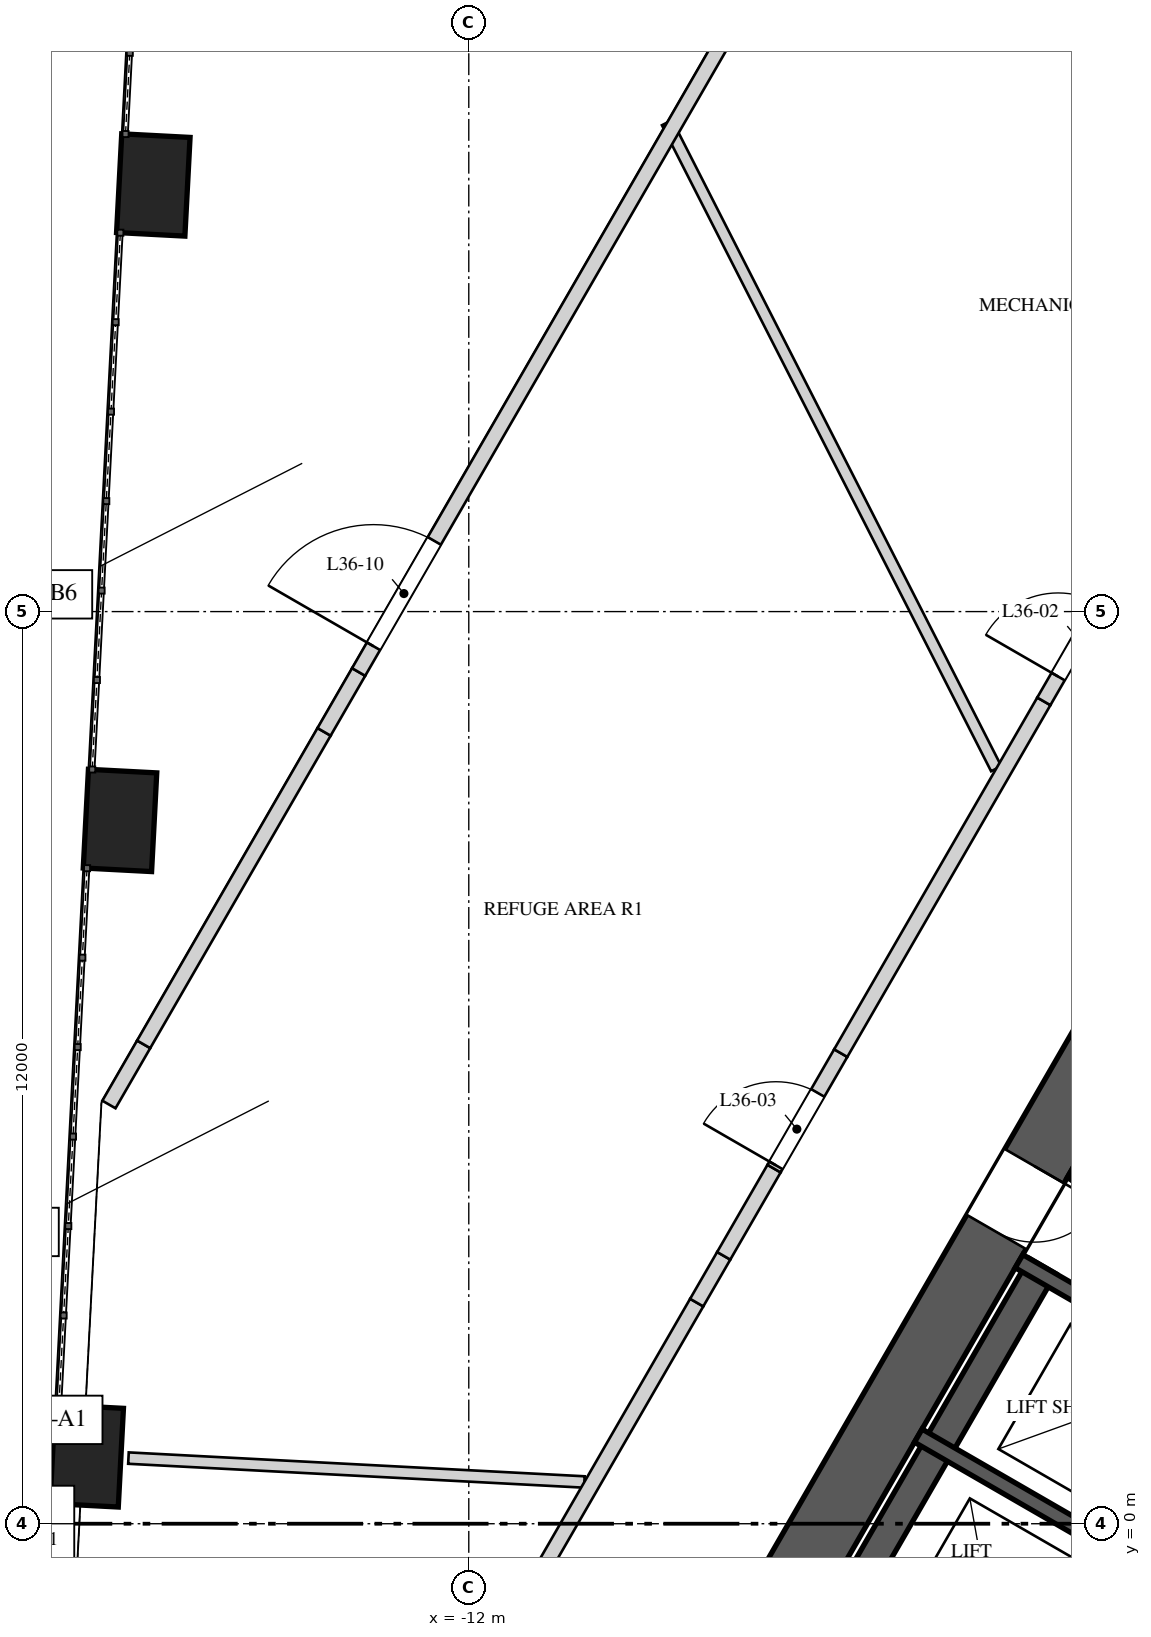
"""IFC4 building model, lengths in metres.
Left out: names, types, materials, properties, quantities, classifications, styles, units other than length and angle.
Written with IfcOpenShell. Run it as: python <this file> out.ifc"""

import sys

from ifc_helpers import new_model, si_unit, direction, frame, frame_2d, origin, origin_2d, place, context, subcontext, project, spatial, polyline, rectangle, outline, extrude, element, fill, save


model = new_model("IFC4")
c1 = context("Model", 3, precision=1e-05, world=origin(), true_north=direction((0.0, 1.0)))
c2 = subcontext(c1, "Body", "Model", "MODEL_VIEW")
j1 = project(units=[si_unit("LENGTHUNIT", "METRE"), si_unit("PLANEANGLEUNIT", "RADIAN")], contexts=[c1])
p1 = place(None, origin())
s1 = spatial("IfcSite", under=j1, at=p1, CompositionType="ELEMENT")
p2 = place(p1, origin())
s2 = spatial("IfcBuilding", under=s1, at=p2, CompositionType="ELEMENT")
p3 = place(p2, frame((0.0, 0.0, 157.6)))
s3 = spatial("IfcBuildingStorey", under=s2, at=p3, CompositionType="ELEMENT", Elevation=157.6)
p4 = place(p3, frame((-1.184, 10.55, 0.0), z_axis=(0.0, 0.0, 1.0), x_axis=(-0.500004814304, -0.866022624227, 0.0)))
e1 = element("IfcWall", 1, at=p4, inside=s3, PredefinedType="SHEAR", context=c2, shape_type="SweptSolid", body=[
    extrude(rectangle(XDim=17.09, YDim=0.9, at=frame_2d((8.545, 0.0))), origin(), (0.0, 0.0, 1.0), 5.2),
])
p5 = place(p4, frame((6.75, 0.0, 0.0)))
e2 = element("IfcOpeningElement", 2, at=p5, cuts=e1, PredefinedType="OPENING", context=c2, shape_type="SweptSolid", body=[
    extrude(rectangle(XDim=1.0, YDim=2.4, at=frame_2d((0.5, 1.2))), frame((0.0, 0.46, 0.0), z_axis=(0.0, -1.0, 0.0), x_axis=(1.0, 0.0, 0.0)), (0.0, 0.0, 1.0), 0.92),
])
for number, where, z_axis, x_axis in (
    (3, (-16.15, 17.613, 0.0), (0.0, 0.0, 1.0), (-0.052, -0.999, 0.0)),
    (4, (-16.588, 9.252, 0.0), (0.0, 0.0, 1.0), (-0.052, -0.999, 0.0)),
    (5, (-17.027, 0.892, 0.0), (0.0, 0.0, 1.0), (-0.052, -0.999, 0.0)),
):
    element("IfcColumn", number, at=place(p3, frame(where, z_axis=z_axis, x_axis=x_axis)), inside=s3, PredefinedType="COLUMN", context=c2, shape_type="SweptSolid", body=[
        extrude(rectangle(XDim=1.3, YDim=0.9, at=origin_2d()), origin(), (0.0, 0.0, 1.0), 2.835),
    ])
p6 = place(p3, frame((-1.521, 3.165, 0.0), z_axis=(0.0, 0.0, 1.0), x_axis=(-0.866039495442, 0.49997559174, 0.0)))
e6 = element("IfcWall", 6, at=p6, inside=s3, PredefinedType="SOLIDWALL", context=c2, shape_type="SweptSolid", body=[
    extrude(rectangle(XDim=2.95, YDim=0.2, at=frame_2d((1.475, 0.0))), origin(), (0.0, 0.0, 1.0), 4.85),
])
p7 = place(p6, frame((0.725, 0.0, 0.0)))
e7 = element("IfcOpeningElement", 7, at=p7, cuts=e6, PredefinedType="OPENING", context=c2, shape_type="SweptSolid", body=[
    extrude(rectangle(XDim=1.1, YDim=2.4, at=frame_2d((0.55, 1.2))), frame((0.0, 0.11, 0.0), z_axis=(0.0, -1.0, 0.0), x_axis=(1.0, 0.0, 0.0)), (0.0, 0.0, 1.0), 0.22),
])
p8 = place(p3, frame((-2.243, 2.115, 0.0), z_axis=(0.0, 0.0, 1.0), x_axis=(-0.499996545922, -0.866027397988, 0.0)))
e8 = element("IfcWall", 8, at=p8, inside=s3, PredefinedType="SOLIDWALL", context=c2, shape_type="SweptSolid", body=[
    extrude(rectangle(XDim=5.5, YDim=0.2, at=frame_2d((2.75, 0.0))), origin(), (0.0, 0.0, 1.0), 4.85),
])
p9 = place(p8, frame((1.22, 0.0, 0.0)))
e9 = element("IfcOpeningElement", 9, at=p9, cuts=e8, PredefinedType="OPENING", context=c2, shape_type="SweptSolid", body=[
    extrude(rectangle(XDim=1.1, YDim=2.1, at=frame_2d((0.55, 1.05))), frame((0.0, 0.11, 0.0), z_axis=(0.0, -1.0, 0.0), x_axis=(1.0, 0.0, 0.0)), (0.0, 0.0, 1.0), 0.22),
])
p10 = place(p8, frame((3.525, 0.0, 0.0)))
e10 = element("IfcOpeningElement", 10, at=p10, cuts=e8, PredefinedType="OPENING", context=c2, shape_type="SweptSolid", body=[
    extrude(rectangle(XDim=1.1, YDim=2.1, at=frame_2d((0.55, 1.05))), frame((0.0, 0.11, 0.0), z_axis=(0.0, -1.0, 0.0), x_axis=(1.0, 0.0, 0.0)), (0.0, 0.0, 1.0), 0.22),
])
p11 = place(p3, frame((-4.451, 3.39, 0.0), z_axis=(0.0, 0.0, 1.0), x_axis=(-0.499996545922, -0.866027397988, 0.0)))
e11 = element("IfcWall", 11, at=p11, inside=s3, PredefinedType="SOLIDWALL", context=c2, shape_type="SweptSolid", body=[
    extrude(rectangle(XDim=5.5, YDim=0.4, at=frame_2d((2.75, 0.0))), origin(), (0.0, 0.0, 1.0), 4.85),
])
for number, where, z_axis, x_axis in (
    (12, (-2.38, 2.078, 0.0), (0.0, 0.0, 1.0), (-0.866, 0.5, 0.0)),
    (13, (-3.705, -0.217, 0.0), (0.0, 0.0, 1.0), (-0.866, 0.5, 0.0)),
):
    element("IfcWall", number, at=place(p3, frame(where, z_axis=z_axis, x_axis=x_axis)), inside=s3, PredefinedType="SOLIDWALL", context=c2, shape_type="SweptSolid", body=[
        extrude(rectangle(XDim=2.75, YDim=0.2, at=frame_2d((1.375, 0.0))), origin(), (0.0, 0.0, 1.0), 4.85),
    ])
p12 = place(p3, frame((-10.479, 0.549, 0.0), z_axis=(0.0, 0.0, 1.0), x_axis=(-0.998630600864, 0.052315609692, 0.0)))
e14 = element("IfcWall", 14, at=p12, inside=s3, PredefinedType="PARTITIONING", context=c2, shape_type="SweptSolid", body=[
    extrude(rectangle(XDim=6.006, YDim=0.15, at=frame_2d((3.003, 0.0))), origin(), (0.0, 0.0, 1.0), 4.85),
])
p13 = place(p3, frame((-5.061, 9.934, 0.0), z_axis=(0.0, 0.0, 1.0), x_axis=(-0.453998628556, 0.891002382303, 0.0)))
e15 = element("IfcWall", 15, at=p13, inside=s3, PredefinedType="PARTITIONING", context=c2, shape_type="SweptSolid", body=[
    extrude(rectangle(XDim=9.539, YDim=0.15, at=frame_2d((4.77, 0.0))), origin(), (0.0, 0.0, 1.0), 4.85),
])
p14 = place(p3, frame((-11.155, -0.821, 0.0), z_axis=(0.0, 0.0, 1.0), x_axis=(0.499992344383, 0.866029823712, 0.0)))
e16 = element("IfcWall", 16, at=p14, inside=s3, PredefinedType="SOLIDWALL", context=c2, shape_type="SweptSolid", body=[
    extrude(rectangle(XDim=4.307, YDim=0.2, at=frame_2d((2.153, 0.0))), origin(), (0.0, 0.0, 1.0), 4.85),
])
p15 = place(p3, frame((-9.001, 2.909, 0.0), z_axis=(0.0, 0.0, 1.0), x_axis=(0.50012879774, 0.865951029603, 0.0)))
e17 = element("IfcWall", 17, at=p15, inside=s3, PredefinedType="SOLIDWALL", context=c2, shape_type="SweptSolid", body=[
    extrude(rectangle(XDim=0.711, YDim=0.2, at=frame_2d((0.355, 0.0))), origin(), (0.0, 0.0, 1.0), 4.15),
])
p16 = place(p3, frame((-8.646, 3.525, 0.0), z_axis=(0.0, 0.0, 1.0), x_axis=(0.500084111773, 0.865976836383, 0.0)))
e18 = element("IfcWall", 18, at=p16, inside=s3, PredefinedType="SOLIDWALL", context=c2, shape_type="SweptSolid", body=[
    extrude(rectangle(XDim=1.324, YDim=0.2, at=frame_2d((0.662, 0.0))), origin(), (0.0, 0.0, 1.0), 4.85),
])
p17 = place(p3, frame((-7.984, 4.672, 0.0), z_axis=(0.0, 0.0, 1.0), x_axis=(0.499895082464, 0.866085969479, 0.0)))
e19 = element("IfcWall", 19, at=p17, inside=s3, PredefinedType="SOLIDWALL", context=c2, shape_type="SweptSolid", body=[
    extrude(outline(polyline([(0.0, 0.0), (1.755, 0.0), (1.755, 3.75), (0.845, 3.75), (0.845, 4.85), (0.0, 4.85), (0.0, 0.0)])), frame((0.0, 0.1, 0.0), z_axis=(0.0, -1.0, 0.0), x_axis=(1.0, 0.0, 0.0)), (0.0, 0.0, 1.0), 0.2),
])
p18 = place(p17, frame((0.05, 0.0, 0.0)))
e20 = element("IfcOpeningElement", 20, at=p18, cuts=e19, PredefinedType="OPENING", context=c2, shape_type="SweptSolid", body=[
    extrude(rectangle(XDim=1.1, YDim=2.2, at=frame_2d((0.55, 1.1))), frame((0.0, 0.11, 0.0), z_axis=(0.0, -1.0, 0.0), x_axis=(1.0, 0.0, 0.0)), (0.0, 0.0, 1.0), 0.22),
])
p19 = place(p3, frame((-7.106, 6.191, 0.0), z_axis=(0.0, 0.0, 1.0), x_axis=(0.500011158634, 0.866018961248, 0.0)))
e21 = element("IfcWall", 21, at=p19, inside=s3, PredefinedType="SOLIDWALL", context=c2, shape_type="SweptSolid", body=[
    extrude(rectangle(XDim=5.344, YDim=0.2, at=frame_2d((2.672, 0.0))), origin(), (0.0, 0.0, 1.0), 4.85),
])
p20 = place(p3, frame((-4.435, 10.819, 0.0), z_axis=(0.0, 0.0, 1.0), x_axis=(0.500008507724, 0.866020491792, 0.0)))
e22 = element("IfcWall", 22, at=p20, inside=s3, PredefinedType="SOLIDWALL", context=c2, shape_type="SweptSolid", body=[
    extrude(outline(polyline([(0.0, 0.0), (1.527, 0.0), (1.527, 4.85), (1.039, 4.85), (1.039, 3.95), (0.0, 3.95), (0.0, 0.0)])), frame((0.0, 0.1, 0.0), z_axis=(0.0, -1.0, 0.0), x_axis=(1.0, 0.0, 0.0)), (0.0, 0.0, 1.0), 0.2),
])
p21 = place(p20, frame((0.377, 0.0, 0.0)))
e23 = element("IfcOpeningElement", 23, at=p21, cuts=e22, PredefinedType="OPENING", context=c2, shape_type="SweptSolid", body=[
    extrude(rectangle(XDim=1.1, YDim=2.2, at=frame_2d((0.55, 1.1))), frame((0.0, 0.11, 0.0), z_axis=(0.0, -1.0, 0.0), x_axis=(1.0, 0.0, 0.0)), (0.0, 0.0, 1.0), 0.22),
])
p22 = place(p3, frame((-16.734, 5.515, 0.0), z_axis=(0.0, 0.0, 1.0), x_axis=(0.500046162864, 0.865998750002, 0.0)))
e24 = element("IfcWall", 24, at=p22, inside=s3, PredefinedType="SOLIDWALL", context=c2, shape_type="SweptSolid", body=[
    extrude(rectangle(XDim=0.914, YDim=0.2, at=frame_2d((0.457, 0.0))), origin(), (0.0, 0.0, 1.0), 4.15),
])
p23 = place(p3, frame((-16.277, 6.307, 0.0), z_axis=(0.0, 0.0, 1.0), x_axis=(0.50002222493, 0.866012571835, 0.0)))
e25 = element("IfcWall", 25, at=p23, inside=s3, PredefinedType="SOLIDWALL", context=c2, shape_type="SweptSolid", body=[
    extrude(rectangle(XDim=4.747, YDim=0.2, at=frame_2d((2.374, 0.0))), origin(), (0.0, 0.0, 1.0), 4.85),
])
p24 = place(p3, frame((-13.904, 10.418, 0.0), z_axis=(0.0, 0.0, 1.0), x_axis=(0.499776670437, 0.866154304779, 0.0)))
e26 = element("IfcWall", 26, at=p24, inside=s3, PredefinedType="SOLIDWALL", context=c2, shape_type="SweptSolid", body=[
    extrude(rectangle(XDim=0.91, YDim=0.2, at=frame_2d((0.455, 0.0))), origin(), (0.0, 0.0, 1.0), 3.75),
])
p25 = place(p3, frame((-13.449, 11.206, 0.0), z_axis=(0.0, 0.0, 1.0), x_axis=(0.500009239692, 0.86602006918, 0.0)))
e27 = element("IfcWall", 27, at=p25, inside=s3, PredefinedType="SOLIDWALL", context=c2, shape_type="SweptSolid", body=[
    extrude(rectangle(XDim=10.808, YDim=0.2, at=frame_2d((5.404, 0.0))), origin(), (0.0, 0.0, 1.0), 4.85),
])
p26 = place(p25, frame((0.391, 0.0, 0.0)))
e28 = element("IfcOpeningElement", 28, at=p26, cuts=e27, PredefinedType="OPENING", context=c2, shape_type="SweptSolid", body=[
    extrude(rectangle(XDim=1.6, YDim=2.3, at=frame_2d((0.8, 1.15))), frame((0.0, 0.11, 0.0), z_axis=(0.0, -1.0, 0.0), x_axis=(1.0, 0.0, 0.0)), (0.0, 0.0, 1.0), 0.22),
])
p27 = place(p5, origin())
e29 = element("IfcDoor", 29, at=p27, inside=s3, OperationType="SINGLE_SWING_RIGHT", PredefinedType="DOOR", context=c2, shape_type="SweptSolid", body=[
    extrude(rectangle(XDim=1.0, YDim=2.4, at=frame_2d((0.5, 1.2))), frame((0.0, 0.025, 0.0), z_axis=(0.0, -1.0, 0.0), x_axis=(1.0, 0.0, 0.0)), (0.0, 0.0, 1.0), 0.05),
])
fill(e2, e29)
p28 = place(p21, origin())
e30 = element("IfcDoor", 30, at=p28, inside=s3, OperationType="SINGLE_SWING_RIGHT", PredefinedType="DOOR", context=c2, shape_type="SweptSolid", body=[
    extrude(rectangle(XDim=1.1, YDim=2.2, at=frame_2d((0.55, 1.1))), frame((0.0, 0.025, 0.0), z_axis=(0.0, -1.0, 0.0), x_axis=(1.0, 0.0, 0.0)), (0.0, 0.0, 1.0), 0.05),
])
fill(e23, e30)
p29 = place(p18, origin())
e31 = element("IfcDoor", 31, at=p29, inside=s3, OperationType="SINGLE_SWING_LEFT", PredefinedType="DOOR", context=c2, shape_type="SweptSolid", body=[
    extrude(rectangle(XDim=1.1, YDim=2.2, at=frame_2d((0.55, 1.1))), frame((0.0, 0.025, 0.0), z_axis=(0.0, -1.0, 0.0), x_axis=(1.0, 0.0, 0.0)), (0.0, 0.0, 1.0), 0.05),
])
fill(e20, e31)
p30 = place(p26, origin())
e32 = element("IfcDoor", 32, at=p30, inside=s3, OperationType="DOUBLE_DOOR_SINGLE_SWING", PredefinedType="DOOR", context=c2, shape_type="SweptSolid", body=[
    extrude(rectangle(XDim=1.6, YDim=2.3, at=frame_2d((0.8, 1.15))), frame((0.0, 0.025, 0.0), z_axis=(0.0, -1.0, 0.0), x_axis=(1.0, 0.0, 0.0)), (0.0, 0.0, 1.0), 0.05),
])
fill(e28, e32)
save(model, sys.argv[1])
